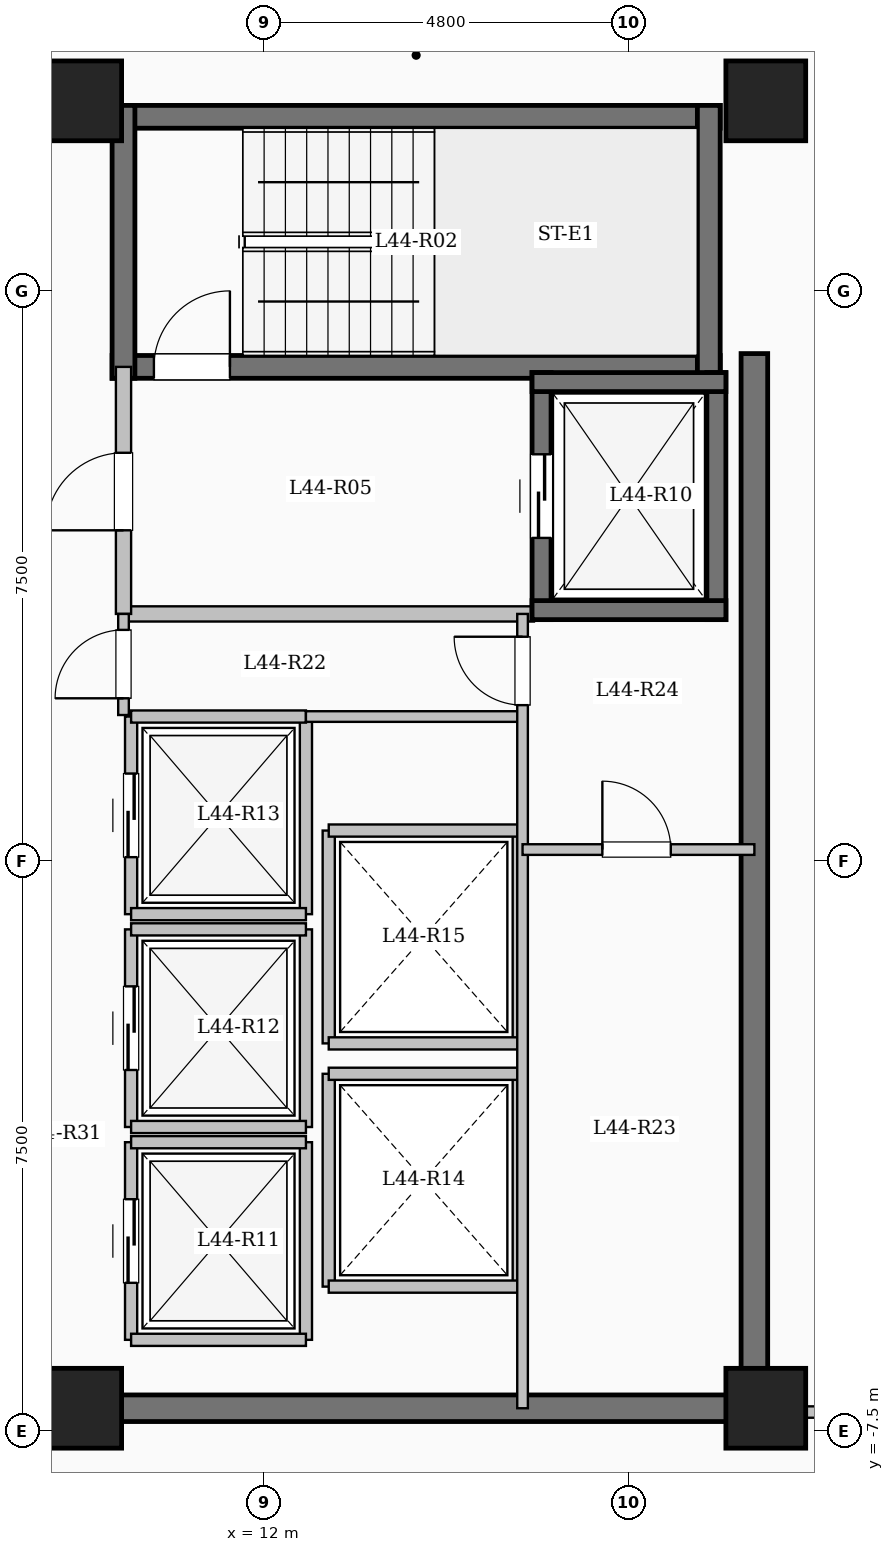
"""IFC4 building model, lengths in metres.
Left out: names, types, materials, properties, quantities, classifications, styles, units other than length and angle.
Written with IfcOpenShell. Run it as: python <this file> out.ifc"""

import sys

from ifc_helpers import new_model, si_unit, direction, frame, frame_2d, origin, origin_2d, place, context, subcontext, project, spatial, rectangle, extrude, element, fill, save


model = new_model("IFC4")
c1 = context("Model", 3, precision=1e-05, world=origin(), true_north=direction((0.0, 1.0)))
c2 = subcontext(c1, "Body", "Model", "MODEL_VIEW")
j1 = project(units=[si_unit("LENGTHUNIT", "METRE"), si_unit("PLANEANGLEUNIT", "RADIAN")], contexts=[c1])
p1 = place(None, origin())
s1 = spatial("IfcSite", under=j1, at=p1, CompositionType="ELEMENT")
p2 = place(p1, origin())
s2 = spatial("IfcBuilding", under=s1, at=p2, CompositionType="ELEMENT")
p3 = place(p2, frame((0.0, 0.0, 162.75)))
s3 = spatial("IfcBuildingStorey", under=s2, at=p3, CompositionType="ELEMENT", Elevation=162.75)
for number, where, z_axis, x_axis in (
    (1, (9.6, -7.2, 0.0), (0.0, 0.0, 1.0), (1.0, 0.0, 0.0)),
    (2, (9.6, 10.0, 0.0), (0.0, 0.0, 1.0), (1.0, 0.0, 0.0)),
    (3, (18.6, -7.2, 0.0), (0.0, 0.0, 1.0), (1.0, 0.0, 0.0)),
    (4, (18.6, 10.0, 0.0), (0.0, 0.0, 1.0), (1.0, 0.0, 0.0)),
):
    element("IfcColumn", number, at=place(p3, frame(where, z_axis=z_axis, x_axis=x_axis)), inside=s3, PredefinedType="COLUMN", context=c2, shape_type="SweptSolid", body=[
        extrude(rectangle(XDim=1.05, YDim=1.05, at=origin_2d()), origin(), (0.0, 0.0, 1.0), 3.35),
    ])
p4 = place(p3, frame((10.0, 9.79, 0.0), z_axis=(0.0, 0.0, 1.0), x_axis=(1.0, 0.0, 0.0)))
e5 = element("IfcWall", 5, at=p4, inside=s3, PredefinedType="SHEAR", context=c2, shape_type="SweptSolid", body=[
    extrude(rectangle(XDim=8.0, YDim=0.3, at=frame_2d((4.0, 0.0))), origin(), (0.0, 0.0, 1.0), 3.35),
])
p5 = place(p3, frame((10.0, 6.5, 0.0), z_axis=(0.0, 0.0, 1.0), x_axis=(1.0, 0.0, 0.0)))
e6 = element("IfcWall", 6, at=p5, inside=s3, PredefinedType="SHEAR", context=c2, shape_type="SweptSolid", body=[
    extrude(rectangle(XDim=8.0, YDim=0.3, at=frame_2d((4.0, 0.0))), origin(), (0.0, 0.0, 1.0), 3.35),
])
p6 = place(p5, frame((0.55, 0.0, 0.0)))
e7 = element("IfcOpeningElement", 7, at=p6, cuts=e6, PredefinedType="OPENING", context=c2, shape_type="SweptSolid", body=[
    extrude(rectangle(XDim=1.0, YDim=2.15, at=frame_2d((0.5, 1.075))), frame((0.0, 0.16, 0.0), z_axis=(0.0, -1.0, 0.0), x_axis=(1.0, 0.0, 0.0)), (0.0, 0.0, 1.0), 0.32),
])
for number, where, z_axis, x_axis in (
    (8, (10.15, 6.35, 0.0), (0.0, 0.0, 1.0), (0.0, 1.0, 0.0)),
    (9, (17.85, 6.35, 0.0), (0.0, 0.0, 1.0), (0.0, 1.0, 0.0)),
):
    element("IfcWall", number, at=place(p3, frame(where, z_axis=z_axis, x_axis=x_axis)), inside=s3, PredefinedType="SHEAR", context=c2, shape_type="SweptSolid", body=[
        extrude(rectangle(XDim=3.59, YDim=0.3, at=frame_2d((1.795, 0.0))), origin(), (0.0, 0.0, 1.0), 3.35),
    ])
p7 = place(p3, frame((10.15, 3.25, 0.0), z_axis=(0.0, 0.0, 1.0), x_axis=(1.0, 0.0, 0.0)))
e10 = element("IfcWall", 10, at=p7, inside=s3, PredefinedType="SOLIDWALL", context=c2, shape_type="SweptSolid", body=[
    extrude(rectangle(XDim=5.4, YDim=0.2, at=frame_2d((2.7, 0.0))), origin(), (0.0, 0.0, 1.0), 3.1),
])
p8 = place(p3, frame((10.15, 3.25, 0.0), z_axis=(0.0, 0.0, 1.0), x_axis=(0.0, 1.0, 0.0)))
e11 = element("IfcWall", 11, at=p8, inside=s3, PredefinedType="SOLIDWALL", context=c2, shape_type="SweptSolid", body=[
    extrude(rectangle(XDim=3.25, YDim=0.2, at=frame_2d((1.625, 0.0))), origin(), (0.0, 0.0, 1.0), 3.1),
])
p9 = place(p8, frame((1.1, 0.0, 0.0)))
e12 = element("IfcOpeningElement", 12, at=p9, cuts=e11, PredefinedType="OPENING", context=c2, shape_type="SweptSolid", body=[
    extrude(rectangle(XDim=1.02, YDim=2.15, at=frame_2d((0.51, 1.075))), frame((0.0, 0.11, 0.0), z_axis=(0.0, -1.0, 0.0), x_axis=(1.0, 0.0, 0.0)), (0.0, 0.0, 1.0), 0.22),
])
p10 = place(p3, frame((15.65, 3.175, 0.0), z_axis=(0.0, 0.0, 1.0), x_axis=(0.0, 1.0, 0.0)))
e13 = element("IfcWall", 13, at=p10, inside=s3, PredefinedType="SHEAR", context=c2, shape_type="SweptSolid", body=[
    extrude(rectangle(XDim=3.25, YDim=0.25, at=frame_2d((1.625, 0.0))), origin(), (0.0, 0.0, 1.0), 3.35),
])
p11 = place(p10, frame((1.075, 0.0, 0.0)))
e14 = element("IfcOpeningElement", 14, at=p11, cuts=e13, PredefinedType="OPENING", context=c2, shape_type="SweptSolid", body=[
    extrude(rectangle(XDim=1.1, YDim=2.15, at=frame_2d((0.55, 1.075))), frame((0.0, 0.135, 0.0), z_axis=(0.0, -1.0, 0.0), x_axis=(1.0, 0.0, 0.0)), (0.0, 0.0, 1.0), 0.27),
])
p12 = place(p3, frame((17.95, 3.175, 0.0), z_axis=(0.0, 0.0, 1.0), x_axis=(0.0, 1.0, 0.0)))
e15 = element("IfcWall", 15, at=p12, inside=s3, PredefinedType="SHEAR", context=c2, shape_type="SweptSolid", body=[
    extrude(rectangle(XDim=3.25, YDim=0.25, at=frame_2d((1.625, 0.0))), origin(), (0.0, 0.0, 1.0), 3.35),
])
for number, where, z_axis, x_axis in (
    (16, (15.525, 3.3, 0.0), (0.0, 0.0, 1.0), (1.0, 0.0, 0.0)),
    (17, (15.525, 6.3, 0.0), (0.0, 0.0, 1.0), (1.0, 0.0, 0.0)),
):
    element("IfcWall", number, at=place(p3, frame(where, z_axis=z_axis, x_axis=x_axis)), inside=s3, PredefinedType="SHEAR", context=c2, shape_type="SweptSolid", body=[
        extrude(rectangle(XDim=2.55, YDim=0.25, at=frame_2d((1.275, 0.0))), origin(), (0.0, 0.0, 1.0), 3.35),
    ])
p13 = place(p3, frame((10.25, -6.3, 0.0), z_axis=(0.0, 0.0, 1.0), x_axis=(0.0, 1.0, 0.0)))
e18 = element("IfcWall", 18, at=p13, inside=s3, PredefinedType="SOLIDWALL", context=c2, shape_type="SweptSolid", body=[
    extrude(rectangle(XDim=2.6, YDim=0.16, at=frame_2d((1.3, 0.0))), origin(), (0.0, 0.0, 1.0), 3.1),
])
p14 = place(p13, frame((0.75, 0.0, 0.0)))
e19 = element("IfcOpeningElement", 19, at=p14, cuts=e18, PredefinedType="OPENING", context=c2, shape_type="SweptSolid", body=[
    extrude(rectangle(XDim=1.1, YDim=2.15, at=frame_2d((0.55, 1.075))), frame((0.0, 0.09, 0.0), z_axis=(0.0, -1.0, 0.0), x_axis=(1.0, 0.0, 0.0)), (0.0, 0.0, 1.0), 0.18),
])
p15 = place(p3, frame((12.55, -6.3, 0.0), z_axis=(0.0, 0.0, 1.0), x_axis=(0.0, 1.0, 0.0)))
e20 = element("IfcWall", 20, at=p15, inside=s3, PredefinedType="SOLIDWALL", context=c2, shape_type="SweptSolid", body=[
    extrude(rectangle(XDim=2.6, YDim=0.16, at=frame_2d((1.3, 0.0))), origin(), (0.0, 0.0, 1.0), 3.1),
])
for number, where, z_axis, x_axis in (
    (21, (10.25, -6.3, 0.0), (0.0, 0.0, 1.0), (1.0, 0.0, 0.0)),
    (22, (10.25, -3.7, 0.0), (0.0, 0.0, 1.0), (1.0, 0.0, 0.0)),
):
    element("IfcWall", number, at=place(p3, frame(where, z_axis=z_axis, x_axis=x_axis)), inside=s3, PredefinedType="SOLIDWALL", context=c2, shape_type="SweptSolid", body=[
        extrude(rectangle(XDim=2.3, YDim=0.16, at=frame_2d((1.15, 0.0))), origin(), (0.0, 0.0, 1.0), 3.1),
    ])
p16 = place(p3, frame((10.25, -3.5, 0.0), z_axis=(0.0, 0.0, 1.0), x_axis=(0.0, 1.0, 0.0)))
e23 = element("IfcWall", 23, at=p16, inside=s3, PredefinedType="SOLIDWALL", context=c2, shape_type="SweptSolid", body=[
    extrude(rectangle(XDim=2.6, YDim=0.16, at=frame_2d((1.3, 0.0))), origin(), (0.0, 0.0, 1.0), 3.1),
])
p17 = place(p16, frame((0.75, 0.0, 0.0)))
e24 = element("IfcOpeningElement", 24, at=p17, cuts=e23, PredefinedType="OPENING", context=c2, shape_type="SweptSolid", body=[
    extrude(rectangle(XDim=1.1, YDim=2.15, at=frame_2d((0.55, 1.075))), frame((0.0, 0.09, 0.0), z_axis=(0.0, -1.0, 0.0), x_axis=(1.0, 0.0, 0.0)), (0.0, 0.0, 1.0), 0.18),
])
p18 = place(p3, frame((12.55, -3.5, 0.0), z_axis=(0.0, 0.0, 1.0), x_axis=(0.0, 1.0, 0.0)))
e25 = element("IfcWall", 25, at=p18, inside=s3, PredefinedType="SOLIDWALL", context=c2, shape_type="SweptSolid", body=[
    extrude(rectangle(XDim=2.6, YDim=0.16, at=frame_2d((1.3, 0.0))), origin(), (0.0, 0.0, 1.0), 3.1),
])
for number, where, z_axis, x_axis in (
    (26, (10.25, -3.5, 0.0), (0.0, 0.0, 1.0), (1.0, 0.0, 0.0)),
    (27, (10.25, -0.9, 0.0), (0.0, 0.0, 1.0), (1.0, 0.0, 0.0)),
):
    element("IfcWall", number, at=place(p3, frame(where, z_axis=z_axis, x_axis=x_axis)), inside=s3, PredefinedType="SOLIDWALL", context=c2, shape_type="SweptSolid", body=[
        extrude(rectangle(XDim=2.3, YDim=0.16, at=frame_2d((1.15, 0.0))), origin(), (0.0, 0.0, 1.0), 3.1),
    ])
p19 = place(p3, frame((10.25, -0.7, 0.0), z_axis=(0.0, 0.0, 1.0), x_axis=(0.0, 1.0, 0.0)))
e28 = element("IfcWall", 28, at=p19, inside=s3, PredefinedType="SOLIDWALL", context=c2, shape_type="SweptSolid", body=[
    extrude(rectangle(XDim=2.6, YDim=0.16, at=frame_2d((1.3, 0.0))), origin(), (0.0, 0.0, 1.0), 3.1),
])
p20 = place(p19, frame((0.75, 0.0, 0.0)))
e29 = element("IfcOpeningElement", 29, at=p20, cuts=e28, PredefinedType="OPENING", context=c2, shape_type="SweptSolid", body=[
    extrude(rectangle(XDim=1.1, YDim=2.15, at=frame_2d((0.55, 1.075))), frame((0.0, 0.09, 0.0), z_axis=(0.0, -1.0, 0.0), x_axis=(1.0, 0.0, 0.0)), (0.0, 0.0, 1.0), 0.18),
])
p21 = place(p3, frame((12.55, -0.7, 0.0), z_axis=(0.0, 0.0, 1.0), x_axis=(0.0, 1.0, 0.0)))
e30 = element("IfcWall", 30, at=p21, inside=s3, PredefinedType="SOLIDWALL", context=c2, shape_type="SweptSolid", body=[
    extrude(rectangle(XDim=2.6, YDim=0.16, at=frame_2d((1.3, 0.0))), origin(), (0.0, 0.0, 1.0), 3.1),
])
for number, where, z_axis, x_axis in (
    (31, (10.25, -0.7, 0.0), (0.0, 0.0, 1.0), (1.0, 0.0, 0.0)),
    (32, (10.25, 1.9, 0.0), (0.0, 0.0, 1.0), (1.0, 0.0, 0.0)),
):
    element("IfcWall", number, at=place(p3, frame(where, z_axis=z_axis, x_axis=x_axis)), inside=s3, PredefinedType="SOLIDWALL", context=c2, shape_type="SweptSolid", body=[
        extrude(rectangle(XDim=2.3, YDim=0.16, at=frame_2d((1.15, 0.0))), origin(), (0.0, 0.0, 1.0), 3.1),
    ])
for number, where, z_axis, x_axis in (
    (33, (12.85, -5.6, 0.0), (0.0, 0.0, 1.0), (0.0, 1.0, 0.0)),
    (34, (15.35, -5.6, 0.0), (0.0, 0.0, 1.0), (0.0, 1.0, 0.0)),
):
    element("IfcWall", number, at=place(p3, frame(where, z_axis=z_axis, x_axis=x_axis)), inside=s3, PredefinedType="SOLIDWALL", context=c2, shape_type="SweptSolid", body=[
        extrude(rectangle(XDim=2.8, YDim=0.16, at=frame_2d((1.4, 0.0))), origin(), (0.0, 0.0, 1.0), 3.1),
    ])
for number, where, z_axis, x_axis in (
    (35, (12.85, -5.6, 0.0), (0.0, 0.0, 1.0), (1.0, 0.0, 0.0)),
    (36, (12.85, -2.8, 0.0), (0.0, 0.0, 1.0), (1.0, 0.0, 0.0)),
):
    element("IfcWall", number, at=place(p3, frame(where, z_axis=z_axis, x_axis=x_axis)), inside=s3, PredefinedType="SOLIDWALL", context=c2, shape_type="SweptSolid", body=[
        extrude(rectangle(XDim=2.5, YDim=0.16, at=frame_2d((1.25, 0.0))), origin(), (0.0, 0.0, 1.0), 3.1),
    ])
for number, where, z_axis, x_axis in (
    (37, (12.85, -2.4, 0.0), (0.0, 0.0, 1.0), (0.0, 1.0, 0.0)),
    (38, (15.35, -2.4, 0.0), (0.0, 0.0, 1.0), (0.0, 1.0, 0.0)),
):
    element("IfcWall", number, at=place(p3, frame(where, z_axis=z_axis, x_axis=x_axis)), inside=s3, PredefinedType="SOLIDWALL", context=c2, shape_type="SweptSolid", body=[
        extrude(rectangle(XDim=2.8, YDim=0.16, at=frame_2d((1.4, 0.0))), origin(), (0.0, 0.0, 1.0), 3.1),
    ])
for number, where, z_axis, x_axis in (
    (39, (12.85, -2.4, 0.0), (0.0, 0.0, 1.0), (1.0, 0.0, 0.0)),
    (40, (12.85, 0.4, 0.0), (0.0, 0.0, 1.0), (1.0, 0.0, 0.0)),
):
    element("IfcWall", number, at=place(p3, frame(where, z_axis=z_axis, x_axis=x_axis)), inside=s3, PredefinedType="SOLIDWALL", context=c2, shape_type="SweptSolid", body=[
        extrude(rectangle(XDim=2.5, YDim=0.16, at=frame_2d((1.25, 0.0))), origin(), (0.0, 0.0, 1.0), 3.1),
    ])
p22 = place(p3, frame((18.45, -7.375, 0.0), z_axis=(0.0, 0.0, 1.0), x_axis=(0.0, 1.0, 0.0)))
e41 = element("IfcWall", 41, at=p22, inside=s3, PredefinedType="SHEAR", context=c2, shape_type="SweptSolid", body=[
    extrude(rectangle(XDim=14.05, YDim=0.35, at=frame_2d((7.025, 0.0))), origin(), (0.0, 0.0, 1.0), 3.35),
])
p23 = place(p3, frame((10.075, -7.2, 0.0), z_axis=(0.0, 0.0, 1.0), x_axis=(1.0, 0.0, 0.0)))
e42 = element("IfcWall", 42, at=p23, inside=s3, PredefinedType="SHEAR", context=c2, shape_type="SweptSolid", body=[
    extrude(rectangle(XDim=8.55, YDim=0.35, at=frame_2d((4.275, 0.0))), origin(), (0.0, 0.0, 1.0), 3.35),
])
p24 = place(p3, frame((12.55, 1.9, 0.0), z_axis=(0.0, 0.0, 1.0), x_axis=(1.0, 0.0, 0.0)))
e43 = element("IfcWall", 43, at=p24, inside=s3, PredefinedType="PARTITIONING", context=c2, shape_type="SweptSolid", body=[
    extrude(rectangle(XDim=2.85, YDim=0.14, at=frame_2d((1.425, 0.0))), origin(), (0.0, 0.0, 1.0), 3.1),
])
p25 = place(p3, frame((10.15, 1.92, 0.0), z_axis=(0.0, 0.0, 1.0), x_axis=(0.0, 1.0, 0.0)))
e44 = element("IfcWall", 44, at=p25, inside=s3, PredefinedType="PARTITIONING", context=c2, shape_type="SweptSolid", body=[
    extrude(rectangle(XDim=1.33, YDim=0.14, at=frame_2d((0.665, 0.0))), origin(), (0.0, 0.0, 1.0), 3.1),
])
p26 = place(p25, frame((0.22, 0.0, 0.0)))
e45 = element("IfcOpeningElement", 45, at=p26, cuts=e44, PredefinedType="OPENING", context=c2, shape_type="SweptSolid", body=[
    extrude(rectangle(XDim=0.9, YDim=2.08, at=frame_2d((0.45, 1.04))), frame((0.0, 0.08, 0.0), z_axis=(0.0, -1.0, 0.0), x_axis=(1.0, 0.0, 0.0)), (0.0, 0.0, 1.0), 0.16),
])
p27 = place(p3, frame((15.4, -7.2, 0.0), z_axis=(0.0, 0.0, 1.0), x_axis=(0.0, 1.0, 0.0)))
e46 = element("IfcWall", 46, at=p27, inside=s3, PredefinedType="PARTITIONING", context=c2, shape_type="SweptSolid", body=[
    extrude(rectangle(XDim=10.45, YDim=0.14, at=frame_2d((5.225, 0.0))), origin(), (0.0, 0.0, 1.0), 3.1),
])
p28 = place(p27, frame((9.25, 0.0, 0.0)))
e47 = element("IfcOpeningElement", 47, at=p28, cuts=e46, PredefinedType="OPENING", context=c2, shape_type="SweptSolid", body=[
    extrude(rectangle(XDim=0.9, YDim=2.08, at=frame_2d((0.45, 1.04))), frame((0.0, 0.08, 0.0), z_axis=(0.0, -1.0, 0.0), x_axis=(1.0, 0.0, 0.0)), (0.0, 0.0, 1.0), 0.16),
])
p29 = place(p3, frame((15.4, 0.15, 0.0), z_axis=(0.0, 0.0, 1.0), x_axis=(1.0, 0.0, 0.0)))
e48 = element("IfcWall", 48, at=p29, inside=s3, PredefinedType="PARTITIONING", context=c2, shape_type="SweptSolid", body=[
    extrude(rectangle(XDim=3.05, YDim=0.14, at=frame_2d((1.525, 0.0))), origin(), (0.0, 0.0, 1.0), 3.1),
])
p30 = place(p29, frame((1.05, 0.0, 0.0)))
e49 = element("IfcOpeningElement", 49, at=p30, cuts=e48, PredefinedType="OPENING", context=c2, shape_type="SweptSolid", body=[
    extrude(rectangle(XDim=0.9, YDim=2.08, at=frame_2d((0.45, 1.04))), frame((0.0, 0.08, 0.0), z_axis=(0.0, -1.0, 0.0), x_axis=(1.0, 0.0, 0.0)), (0.0, 0.0, 1.0), 0.16),
])
p31 = place(p3, frame((18.45, -7.25, 0.0), z_axis=(0.0, 0.0, 1.0), x_axis=(1.0, 0.0, 0.0)))
e50 = element("IfcWall", 50, at=p31, inside=s3, PredefinedType="PARTITIONING", context=c2, shape_type="SweptSolid", body=[
    extrude(rectangle(XDim=6.63, YDim=0.15, at=frame_2d((3.315, 0.0))), origin(), (0.0, 0.0, 1.0), 3.1),
])
p32 = place(p31, frame((1.95, 0.0, 0.0)))
e51 = element("IfcOpeningElement", 51, at=p32, cuts=e50, PredefinedType="OPENING", context=c2, shape_type="SweptSolid", body=[
    extrude(rectangle(XDim=1.08, YDim=2.15, at=frame_2d((0.54, 1.075))), frame((0.0, 0.085, 0.0), z_axis=(0.0, -1.0, 0.0), x_axis=(1.0, 0.0, 0.0)), (0.0, 0.0, 1.0), 0.17),
])
p33 = place(p6, origin())
e52 = element("IfcDoor", 52, at=p33, inside=s3, OperationType="SINGLE_SWING_RIGHT", PredefinedType="DOOR", context=c2, shape_type="SweptSolid", body=[
    extrude(rectangle(XDim=1.0, YDim=2.15, at=frame_2d((0.5, 1.075))), frame((0.0, 0.025, 0.0), z_axis=(0.0, -1.0, 0.0), x_axis=(1.0, 0.0, 0.0)), (0.0, 0.0, 1.0), 0.05),
])
fill(e7, e52)
p34 = place(p9, origin())
e53 = element("IfcDoor", 53, at=p34, inside=s3, OperationType="SINGLE_SWING_LEFT", PredefinedType="DOOR", context=c2, shape_type="SweptSolid", body=[
    extrude(rectangle(XDim=1.02, YDim=2.15, at=frame_2d((0.51, 1.075))), frame((0.0, 0.025, 0.0), z_axis=(0.0, -1.0, 0.0), x_axis=(1.0, 0.0, 0.0)), (0.0, 0.0, 1.0), 0.05),
])
fill(e12, e53)
p35 = place(p11, origin())
e54 = element("IfcDoor", 54, at=p35, inside=s3, OperationType="SLIDING_TO_LEFT", PredefinedType="DOOR", context=c2, shape_type="SweptSolid", body=[
    extrude(rectangle(XDim=1.1, YDim=2.15, at=frame_2d((0.55, 1.075))), frame((0.0, 0.025, 0.0), z_axis=(0.0, -1.0, 0.0), x_axis=(1.0, 0.0, 0.0)), (0.0, 0.0, 1.0), 0.05),
])
fill(e14, e54)
p36 = place(p14, origin())
e55 = element("IfcDoor", 55, at=p36, inside=s3, OperationType="SLIDING_TO_LEFT", PredefinedType="DOOR", context=c2, shape_type="SweptSolid", body=[
    extrude(rectangle(XDim=1.1, YDim=2.15, at=frame_2d((0.55, 1.075))), frame((0.0, 0.025, 0.0), z_axis=(0.0, -1.0, 0.0), x_axis=(1.0, 0.0, 0.0)), (0.0, 0.0, 1.0), 0.05),
])
fill(e19, e55)
p37 = place(p17, origin())
e56 = element("IfcDoor", 56, at=p37, inside=s3, OperationType="SLIDING_TO_LEFT", PredefinedType="DOOR", context=c2, shape_type="SweptSolid", body=[
    extrude(rectangle(XDim=1.1, YDim=2.15, at=frame_2d((0.55, 1.075))), frame((0.0, 0.025, 0.0), z_axis=(0.0, -1.0, 0.0), x_axis=(1.0, 0.0, 0.0)), (0.0, 0.0, 1.0), 0.05),
])
fill(e24, e56)
p38 = place(p20, origin())
e57 = element("IfcDoor", 57, at=p38, inside=s3, OperationType="SLIDING_TO_LEFT", PredefinedType="DOOR", context=c2, shape_type="SweptSolid", body=[
    extrude(rectangle(XDim=1.1, YDim=2.15, at=frame_2d((0.55, 1.075))), frame((0.0, 0.025, 0.0), z_axis=(0.0, -1.0, 0.0), x_axis=(1.0, 0.0, 0.0)), (0.0, 0.0, 1.0), 0.05),
])
fill(e29, e57)
p39 = place(p26, origin())
e58 = element("IfcDoor", 58, at=p39, inside=s3, OperationType="SINGLE_SWING_LEFT", PredefinedType="DOOR", context=c2, shape_type="SweptSolid", body=[
    extrude(rectangle(XDim=0.9, YDim=2.08, at=frame_2d((0.45, 1.04))), frame((0.0, 0.025, 0.0), z_axis=(0.0, -1.0, 0.0), x_axis=(1.0, 0.0, 0.0)), (0.0, 0.0, 1.0), 0.05),
])
fill(e45, e58)
p40 = place(p28, origin())
e59 = element("IfcDoor", 59, at=p40, inside=s3, OperationType="SINGLE_SWING_RIGHT", PredefinedType="DOOR", context=c2, shape_type="SweptSolid", body=[
    extrude(rectangle(XDim=0.9, YDim=2.08, at=frame_2d((0.45, 1.04))), frame((0.0, 0.025, 0.0), z_axis=(0.0, -1.0, 0.0), x_axis=(1.0, 0.0, 0.0)), (0.0, 0.0, 1.0), 0.05),
])
fill(e47, e59)
p41 = place(p30, origin())
e60 = element("IfcDoor", 60, at=p41, inside=s3, OperationType="SINGLE_SWING_LEFT", PredefinedType="DOOR", context=c2, shape_type="SweptSolid", body=[
    extrude(rectangle(XDim=0.9, YDim=2.08, at=frame_2d((0.45, 1.04))), frame((0.0, 0.025, 0.0), z_axis=(0.0, -1.0, 0.0), x_axis=(1.0, 0.0, 0.0)), (0.0, 0.0, 1.0), 0.05),
])
fill(e49, e60)
save(model, sys.argv[1])
